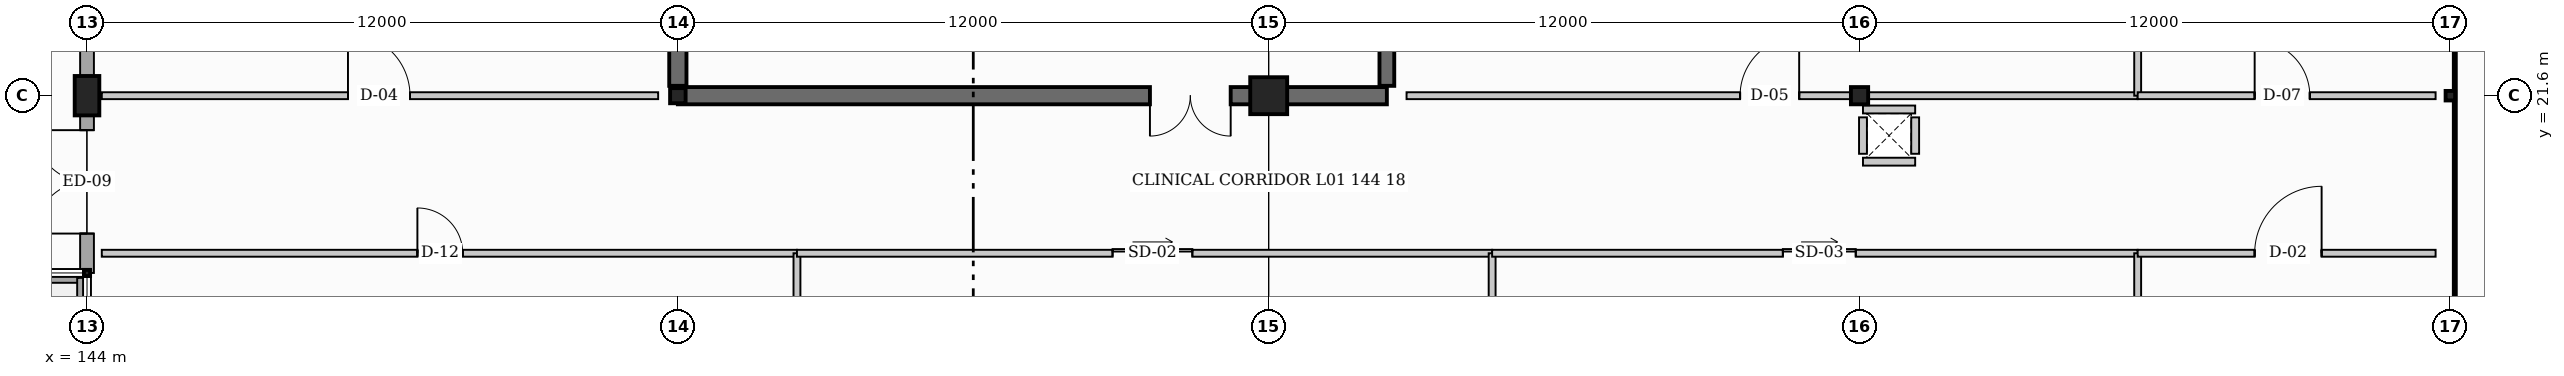
"""IFC4 building model, lengths in metres.
Left out: names, types, materials, properties, quantities, classifications, styles, units other than length and angle.
Written with IfcOpenShell. Run it as: python <this file> out.ifc"""

import sys

from ifc_helpers import new_model, si_unit, direction, frame, frame_2d, origin, origin_2d, place, context, subcontext, project, spatial, rectangle, hollow_rectangle, hollow_circle, i_section, extrude, element, fill, save


model = new_model("IFC4")
c1 = context("Model", 3, precision=1e-05, world=origin(), true_north=direction((0.0, 1.0)))
c2 = subcontext(c1, "Body", "Model", "MODEL_VIEW")
j1 = project(units=[si_unit("LENGTHUNIT", "METRE"), si_unit("PLANEANGLEUNIT", "RADIAN")], contexts=[c1])
p1 = place(None, origin())
s1 = spatial("IfcSite", under=j1, at=p1, CompositionType="ELEMENT")
p2 = place(p1, origin())
s2 = spatial("IfcBuilding", under=s1, at=p2, CompositionType="ELEMENT")
p3 = place(p2, frame((0.0, 0.0, 4.8)))
s3 = spatial("IfcBuildingStorey", under=s2, at=p3, CompositionType="ELEMENT", Elevation=4.8)
p4 = place(p3, frame((144.0, 21.6, 0.0), z_axis=(0.0, 0.0, 1.0), x_axis=(1.0, 0.0, 0.0)))
e1 = element("IfcColumn", 1, at=p4, inside=s3, PredefinedType="PILASTER", context=c2, shape_type="SweptSolid", body=[
    extrude(rectangle(XDim=0.5, YDim=0.8, at=origin_2d()), origin(), (0.0, 0.0, 1.0), 4.8),
])
p5 = place(p3, frame((156.0, 21.6, 0.0), z_axis=(0.0, 0.0, 1.0), x_axis=(0.0, 1.0, 0.0)))
e2 = element("IfcColumn", 2, at=p5, inside=s3, PredefinedType="COLUMN", context=c2, shape_type="SweptSolid", body=[
    extrude(i_section(OverallWidth=0.307, OverallDepth=0.315, WebThickness=0.012, FlangeThickness=0.019, at=origin_2d()), origin(), (0.0, 0.0, 1.0), 4.8),
])
p6 = place(p3, frame((168.0, 21.6, 0.0), z_axis=(0.0, 0.0, 1.0), x_axis=(1.0, 0.0, 0.0)))
e3 = element("IfcColumn", 3, at=p6, inside=s3, PredefinedType="COLUMN", context=c2, shape_type="SweptSolid", body=[
    extrude(rectangle(XDim=0.75, YDim=0.75, at=origin_2d()), origin(), (0.0, 0.0, 1.0), 4.8),
])
p7 = place(p3, frame((180.0, 21.6, 0.0), z_axis=(0.0, 0.0, 1.0), x_axis=(0.0, 1.0, 0.0)))
e4 = element("IfcColumn", 4, at=p7, inside=s3, PredefinedType="COLUMN", context=c2, shape_type="SweptSolid", body=[
    extrude(i_section(OverallWidth=0.35, OverallDepth=0.35, WebThickness=0.014, FlangeThickness=0.024, at=origin_2d()), origin(), (0.0, 0.0, 1.0), 4.8),
])
p8 = place(p3, frame((192.0, 21.6, 0.0), z_axis=(0.0, 0.0, 1.0), x_axis=(1.0, 0.0, 0.0)))
e5 = element("IfcColumn", 5, at=p8, inside=s3, PredefinedType="COLUMN", context=c2, shape_type="SweptSolid", body=[
    extrude(hollow_circle(Radius=0.097, WallThickness=0.008, at=origin_2d()), origin(), (0.0, 0.0, 1.0), 4.8),
])
p9 = place(p3, frame((144.0, 18.0, 0.0), z_axis=(0.0, 0.0, 1.0), x_axis=(1.0, 0.0, 0.0)))
e6 = element("IfcColumn", 6, at=p9, inside=s3, PredefinedType="COLUMN", context=c2, shape_type="SweptSolid", body=[
    extrude(hollow_rectangle(XDim=0.125, YDim=0.125, WallThickness=0.006, at=origin_2d()), origin(), (0.0, 0.0, 1.0), 4.8),
])
p10 = place(p3, frame((170.4, 21.6, 0.0), z_axis=(0.0, 0.0, 1.0), x_axis=(-1.0, 0.0, 0.0)))
e7 = element("IfcWall", 7, at=p10, inside=s3, PredefinedType="SHEAR", context=c2, shape_type="SweptSolid", body=[
    extrude(rectangle(XDim=14.4, YDim=0.35, at=frame_2d((7.2, 0.0))), origin(), (0.0, 0.0, 1.0), 4.8),
])
p11 = place(p10, frame((3.172, 0.0, 0.0)))
e8 = element("IfcOpeningElement", 8, at=p11, cuts=e7, PredefinedType="OPENING", context=c2, shape_type="SweptSolid", body=[
    extrude(rectangle(XDim=1.64, YDim=2.2, at=frame_2d((0.82, 1.1))), frame((0.0, 0.185, 0.0), z_axis=(0.0, -1.0, 0.0), x_axis=(1.0, 0.0, 0.0)), (0.0, 0.0, 1.0), 0.37),
])
p12 = place(p3, frame((156.0, 21.8, 0.0), z_axis=(0.0, 0.0, 1.0), x_axis=(0.0, 1.0, 0.0)))
e9 = element("IfcWall", 9, at=p12, inside=s3, PredefinedType="SHEAR", context=c2, shape_type="SweptSolid", body=[
    extrude(rectangle(XDim=8.0, YDim=0.35, at=frame_2d((4.0, 0.0))), origin(), (0.0, 0.0, 1.0), 4.8),
])
p13 = place(p3, frame((170.4, 29.8, 0.0), z_axis=(0.0, 0.0, 1.0), x_axis=(0.0, -1.0, 0.0)))
e10 = element("IfcWall", 10, at=p13, inside=s3, PredefinedType="SHEAR", context=c2, shape_type="SweptSolid", body=[
    extrude(rectangle(XDim=8.0, YDim=0.3, at=frame_2d((4.0, 0.0))), origin(), (0.0, 0.0, 1.0), 4.8),
])
for number, where, z_axis, x_axis in (
    (11, (180.07, 20.26, 0.0), (0.0, 0.0, 1.0), (1.0, 0.0, 0.0)),
    (12, (181.13, 21.32, 0.0), (0.0, 0.0, 1.0), (-1.0, 0.0, 0.0)),
):
    element("IfcWall", number, at=place(p3, frame(where, z_axis=z_axis, x_axis=x_axis)), inside=s3, PredefinedType="PARTITIONING", context=c2, shape_type="SweptSolid", body=[
        extrude(rectangle(XDim=1.06, YDim=0.16, at=frame_2d((0.53, 0.0))), origin(), (0.0, 0.0, 1.0), 3.55),
    ])
for number, where, z_axis, x_axis in (
    (13, (180.07, 21.16, 0.0), (0.0, 0.0, 1.0), (0.0, -1.0, 0.0)),
    (14, (181.13, 20.42, 0.0), (0.0, 0.0, 1.0), (0.0, 1.0, 0.0)),
):
    element("IfcWall", number, at=place(p3, frame(where, z_axis=z_axis, x_axis=x_axis)), inside=s3, PredefinedType="PARTITIONING", context=c2, shape_type="SweptSolid", body=[
        extrude(rectangle(XDim=0.74, YDim=0.16, at=frame_2d((0.37, 0.0))), origin(), (0.0, 0.0, 1.0), 3.55),
    ])
p14 = place(p3, frame((144.0, 18.0, 0.0), z_axis=(0.0, 0.0, 1.0), x_axis=(0.0, 1.0, 0.0)))
e15 = element("IfcWall", 15, at=p14, inside=s3, PredefinedType="STANDARD", context=c2, shape_type="SweptSolid", body=[
    extrude(rectangle(XDim=9.6, YDim=0.28, at=frame_2d((4.8, 0.0))), origin(), (0.0, 0.0, 1.0), 3.53),
])
p15 = place(p14, frame((0.8, 0.0, 0.0)))
e16 = element("IfcOpeningElement", 16, at=p15, cuts=e15, PredefinedType="OPENING", context=c2, shape_type="SweptSolid", body=[
    extrude(rectangle(XDim=2.1, YDim=2.25, at=frame_2d((1.05, 1.125))), frame((0.0, 0.15, 0.0), z_axis=(0.0, -1.0, 0.0), x_axis=(1.0, 0.0, 0.0)), (0.0, 0.0, 1.0), 0.3),
])
p16 = place(p3, frame((132.1, 17.9, 0.31), z_axis=(0.0, 0.0, 1.0), x_axis=(1.0, 0.0, 0.0)))
e17 = element("IfcWall", 17, at=p16, inside=s3, PredefinedType="PARAPET", context=c2, shape_type="SweptSolid", body=[
    extrude(rectangle(XDim=11.8, YDim=0.2, at=frame_2d((5.9, 0.0))), origin(), (0.0, 0.0, 1.0), 1.12),
])
p17 = place(p3, frame((143.9, 17.9, 0.31), z_axis=(0.0, 0.0, 1.0), x_axis=(0.0, -1.0, 0.0)))
e18 = element("IfcWall", 18, at=p17, inside=s3, PredefinedType="PARAPET", context=c2, shape_type="SweptSolid", body=[
    extrude(rectangle(XDim=7.0, YDim=0.2, at=frame_2d((3.5, 0.0))), origin(), (0.0, 0.0, 1.0), 1.12),
])
p18 = place(p3, frame((144.3, 18.4, 0.0), z_axis=(0.0, 0.0, 1.0), x_axis=(1.0, 0.0, 0.0)))
e19 = element("IfcWall", 19, at=p18, inside=s3, PredefinedType="PARTITIONING", context=c2, shape_type="SweptSolid", body=[
    extrude(rectangle(XDim=14.119, YDim=0.14, at=frame_2d((7.06, 0.0))), origin(), (0.0, 0.0, 1.0), 3.818),
])
p19 = place(p18, frame((6.41, 0.0, 0.0)))
e20 = element("IfcOpeningElement", 20, at=p19, cuts=e19, PredefinedType="OPENING", context=c2, shape_type="SweptSolid", body=[
    extrude(rectangle(XDim=0.92, YDim=2.04, at=frame_2d((0.46, 1.02))), frame((0.0, 0.08, 0.0), z_axis=(0.0, -1.0, 0.0), x_axis=(1.0, 0.0, 0.0)), (0.0, 0.0, 1.0), 0.16),
])
p20 = place(p3, frame((158.419, 0.3, 0.0), z_axis=(0.0, 0.0, 1.0), x_axis=(0.0, 1.0, 0.0)))
e21 = element("IfcWall", 21, at=p20, inside=s3, PredefinedType="PARTITIONING", context=c2, shape_type="SweptSolid", body=[
    extrude(rectangle(XDim=18.1, YDim=0.14, at=frame_2d((9.05, 0.0))), origin(), (0.0, 0.0, 1.0), 3.53),
])
p21 = place(p3, frame((158.419, 18.4, 0.0), z_axis=(0.0, 0.0, 1.0), x_axis=(1.0, 0.0, 0.0)))
e22 = element("IfcWall", 22, at=p21, inside=s3, PredefinedType="PARTITIONING", context=c2, shape_type="SweptSolid", body=[
    extrude(rectangle(XDim=14.119, YDim=0.14, at=frame_2d((7.06, 0.0))), origin(), (0.0, 0.0, 1.0), 3.828),
])
p22 = place(p21, frame((6.41, 0.0, 0.0)))
e23 = element("IfcOpeningElement", 23, at=p22, cuts=e22, PredefinedType="OPENING", context=c2, shape_type="SweptSolid", body=[
    extrude(rectangle(XDim=1.62, YDim=2.3, at=frame_2d((0.81, 1.15))), frame((0.0, 0.08, 0.0), z_axis=(0.0, -1.0, 0.0), x_axis=(1.0, 0.0, 0.0)), (0.0, 0.0, 1.0), 0.16),
])
p23 = place(p3, frame((172.538, 0.3, 0.0), z_axis=(0.0, 0.0, 1.0), x_axis=(0.0, 1.0, 0.0)))
e24 = element("IfcWall", 24, at=p23, inside=s3, PredefinedType="PARTITIONING", context=c2, shape_type="SweptSolid", body=[
    extrude(rectangle(XDim=18.1, YDim=0.14, at=frame_2d((9.05, 0.0))), origin(), (0.0, 0.0, 1.0), 3.738),
])
p24 = place(p3, frame((172.538, 18.4, 0.0), z_axis=(0.0, 0.0, 1.0), x_axis=(1.0, 0.0, 0.0)))
e25 = element("IfcWall", 25, at=p24, inside=s3, PredefinedType="PARTITIONING", context=c2, shape_type="SweptSolid", body=[
    extrude(rectangle(XDim=13.111, YDim=0.14, at=frame_2d((6.555, 0.0))), origin(), (0.0, 0.0, 1.0), 3.897),
])
p25 = place(p24, frame((5.905, 0.0, 0.0)))
e26 = element("IfcOpeningElement", 26, at=p25, cuts=e25, PredefinedType="OPENING", context=c2, shape_type="SweptSolid", body=[
    extrude(rectangle(XDim=1.48, YDim=2.26, at=frame_2d((0.74, 1.13))), frame((0.0, 0.08, 0.0), z_axis=(0.0, -1.0, 0.0), x_axis=(1.0, 0.0, 0.0)), (0.0, 0.0, 1.0), 0.16),
])
p26 = place(p3, frame((185.649, 0.3, 0.0), z_axis=(0.0, 0.0, 1.0), x_axis=(0.0, 1.0, 0.0)))
e27 = element("IfcWall", 27, at=p26, inside=s3, PredefinedType="PARTITIONING", context=c2, shape_type="SweptSolid", body=[
    extrude(rectangle(XDim=18.1, YDim=0.14, at=frame_2d((9.05, 0.0))), origin(), (0.0, 0.0, 1.0), 3.818),
])
p27 = place(p3, frame((185.649, 18.4, 0.0), z_axis=(0.0, 0.0, 1.0), x_axis=(1.0, 0.0, 0.0)))
e28 = element("IfcWall", 28, at=p27, inside=s3, PredefinedType="PARTITIONING", context=c2, shape_type="SweptSolid", body=[
    extrude(rectangle(XDim=6.051, YDim=0.14, at=frame_2d((3.025, 0.0))), origin(), (0.0, 0.0, 1.0), 4.027),
])
p28 = place(p27, frame((2.376, 0.0, 0.0)))
e29 = element("IfcOpeningElement", 29, at=p28, cuts=e28, PredefinedType="OPENING", context=c2, shape_type="SweptSolid", body=[
    extrude(rectangle(XDim=1.36, YDim=2.18, at=frame_2d((0.68, 1.09))), frame((0.0, 0.08, 0.0), z_axis=(0.0, -1.0, 0.0), x_axis=(1.0, 0.0, 0.0)), (0.0, 0.0, 1.0), 0.16),
])
p29 = place(p3, frame((144.3, 21.6, 0.0), z_axis=(0.0, 0.0, 1.0), x_axis=(1.0, 0.0, 0.0)))
e30 = element("IfcWall", 30, at=p29, inside=s3, PredefinedType="PARTITIONING", context=c2, shape_type="SweptSolid", body=[
    extrude(rectangle(XDim=11.3, YDim=0.14, at=frame_2d((5.65, 0.0))), origin(), (0.0, 0.0, 1.0), 3.53),
])
p30 = place(p29, frame((5.0, 0.0, 0.0)))
e31 = element("IfcOpeningElement", 31, at=p30, cuts=e30, PredefinedType="OPENING", context=c2, shape_type="SweptSolid", body=[
    extrude(rectangle(XDim=1.26, YDim=2.14, at=frame_2d((0.63, 1.07))), frame((0.0, 0.08, 0.0), z_axis=(0.0, -1.0, 0.0), x_axis=(1.0, 0.0, 0.0)), (0.0, 0.0, 1.0), 0.16),
])
p31 = place(p3, frame((170.8, 21.6, 0.0), z_axis=(0.0, 0.0, 1.0), x_axis=(1.0, 0.0, 0.0)))
e32 = element("IfcWall", 32, at=p31, inside=s3, PredefinedType="PARTITIONING", context=c2, shape_type="SweptSolid", body=[
    extrude(rectangle(XDim=14.849, YDim=0.14, at=frame_2d((7.424, 0.0))), origin(), (0.0, 0.0, 1.0), 3.818),
])
p32 = place(p31, frame((6.774, 0.0, 0.0)))
e33 = element("IfcOpeningElement", 33, at=p32, cuts=e32, PredefinedType="OPENING", context=c2, shape_type="SweptSolid", body=[
    extrude(rectangle(XDim=1.2, YDim=2.12, at=frame_2d((0.6, 1.06))), frame((0.0, 0.08, 0.0), z_axis=(0.0, -1.0, 0.0), x_axis=(1.0, 0.0, 0.0)), (0.0, 0.0, 1.0), 0.16),
])
p33 = place(p3, frame((185.649, 21.6, 0.0), z_axis=(0.0, 0.0, 1.0), x_axis=(0.0, 1.0, 0.0)))
e34 = element("IfcWall", 34, at=p33, inside=s3, PredefinedType="PARTITIONING", context=c2, shape_type="SweptSolid", body=[
    extrude(rectangle(XDim=23.7, YDim=0.14, at=frame_2d((11.85, 0.0))), origin(), (0.0, 0.0, 1.0), 3.823),
])
p34 = place(p3, frame((185.649, 21.6, 0.0), z_axis=(0.0, 0.0, 1.0), x_axis=(1.0, 0.0, 0.0)))
e35 = element("IfcWall", 35, at=p34, inside=s3, PredefinedType="PARTITIONING", context=c2, shape_type="SweptSolid", body=[
    extrude(rectangle(XDim=6.051, YDim=0.14, at=frame_2d((3.025, 0.0))), origin(), (0.0, 0.0, 1.0), 3.823),
])
p35 = place(p34, frame((2.376, 0.0, 0.0)))
e36 = element("IfcOpeningElement", 36, at=p35, cuts=e35, PredefinedType="OPENING", context=c2, shape_type="SweptSolid", body=[
    extrude(rectangle(XDim=1.12, YDim=2.08, at=frame_2d((0.56, 1.04))), frame((0.0, 0.08, 0.0), z_axis=(0.0, -1.0, 0.0), x_axis=(1.0, 0.0, 0.0)), (0.0, 0.0, 1.0), 0.16),
])
p36 = place(p15, origin())
e37 = element("IfcDoor", 37, at=p36, inside=s3, OperationType="DOUBLE_DOOR_SINGLE_SWING", PredefinedType="DOOR", context=c2, shape_type="SweptSolid", body=[
    extrude(rectangle(XDim=2.1, YDim=2.25, at=frame_2d((1.05, 1.125))), frame((0.0, 0.025, 0.0), z_axis=(0.0, -1.0, 0.0), x_axis=(1.0, 0.0, 0.0)), (0.0, 0.0, 1.0), 0.05),
])
fill(e16, e37)
p37 = place(p11, origin())
e38 = element("IfcDoor", 38, at=p37, inside=s3, OperationType="DOUBLE_DOOR_SINGLE_SWING", PredefinedType="DOOR", context=c2, shape_type="SweptSolid", body=[
    extrude(rectangle(XDim=1.64, YDim=2.2, at=frame_2d((0.82, 1.1))), frame((0.0, 0.025, 0.0), z_axis=(0.0, -1.0, 0.0), x_axis=(1.0, 0.0, 0.0)), (0.0, 0.0, 1.0), 0.05),
])
fill(e8, e38)
p38 = place(p19, origin())
e39 = element("IfcDoor", 39, at=p38, inside=s3, OperationType="SINGLE_SWING_LEFT", PredefinedType="DOOR", context=c2, shape_type="SweptSolid", body=[
    extrude(rectangle(XDim=0.92, YDim=2.04, at=frame_2d((0.46, 1.02))), frame((0.0, 0.025, 0.0), z_axis=(0.0, -1.0, 0.0), x_axis=(1.0, 0.0, 0.0)), (0.0, 0.0, 1.0), 0.05),
])
fill(e20, e39)
p39 = place(p22, origin())
e40 = element("IfcDoor", 40, at=p39, inside=s3, OperationType="SLIDING_TO_RIGHT", PredefinedType="DOOR", context=c2, shape_type="SweptSolid", body=[
    extrude(rectangle(XDim=1.62, YDim=2.3, at=frame_2d((0.81, 1.15))), frame((0.0, 0.025, 0.0), z_axis=(0.0, -1.0, 0.0), x_axis=(1.0, 0.0, 0.0)), (0.0, 0.0, 1.0), 0.05),
])
fill(e23, e40)
p40 = place(p25, origin())
e41 = element("IfcDoor", 41, at=p40, inside=s3, OperationType="SLIDING_TO_LEFT", PredefinedType="DOOR", context=c2, shape_type="SweptSolid", body=[
    extrude(rectangle(XDim=1.48, YDim=2.26, at=frame_2d((0.74, 1.13))), frame((0.0, 0.025, 0.0), z_axis=(0.0, -1.0, 0.0), x_axis=(1.0, 0.0, 0.0)), (0.0, 0.0, 1.0), 0.05),
])
fill(e26, e41)
p41 = place(p28, origin())
e42 = element("IfcDoor", 42, at=p41, inside=s3, OperationType="SINGLE_SWING_RIGHT", PredefinedType="DOOR", context=c2, shape_type="SweptSolid", body=[
    extrude(rectangle(XDim=1.36, YDim=2.18, at=frame_2d((0.68, 1.09))), frame((0.0, 0.025, 0.0), z_axis=(0.0, -1.0, 0.0), x_axis=(1.0, 0.0, 0.0)), (0.0, 0.0, 1.0), 0.05),
])
fill(e29, e42)
p42 = place(p30, origin())
e43 = element("IfcDoor", 43, at=p42, inside=s3, OperationType="SINGLE_SWING_LEFT", PredefinedType="DOOR", context=c2, shape_type="SweptSolid", body=[
    extrude(rectangle(XDim=1.26, YDim=2.14, at=frame_2d((0.63, 1.07))), frame((0.0, 0.025, 0.0), z_axis=(0.0, -1.0, 0.0), x_axis=(1.0, 0.0, 0.0)), (0.0, 0.0, 1.0), 0.05),
])
fill(e31, e43)
p43 = place(p32, origin())
e44 = element("IfcDoor", 44, at=p43, inside=s3, OperationType="SINGLE_SWING_RIGHT", PredefinedType="DOOR", context=c2, shape_type="SweptSolid", body=[
    extrude(rectangle(XDim=1.2, YDim=2.12, at=frame_2d((0.6, 1.06))), frame((0.0, 0.025, 0.0), z_axis=(0.0, -1.0, 0.0), x_axis=(1.0, 0.0, 0.0)), (0.0, 0.0, 1.0), 0.05),
])
fill(e33, e44)
p44 = place(p35, origin())
e45 = element("IfcDoor", 45, at=p44, inside=s3, OperationType="SINGLE_SWING_LEFT", PredefinedType="DOOR", context=c2, shape_type="SweptSolid", body=[
    extrude(rectangle(XDim=1.12, YDim=2.08, at=frame_2d((0.56, 1.04))), frame((0.0, 0.025, 0.0), z_axis=(0.0, -1.0, 0.0), x_axis=(1.0, 0.0, 0.0)), (0.0, 0.0, 1.0), 0.05),
])
fill(e36, e45)
save(model, sys.argv[1])
